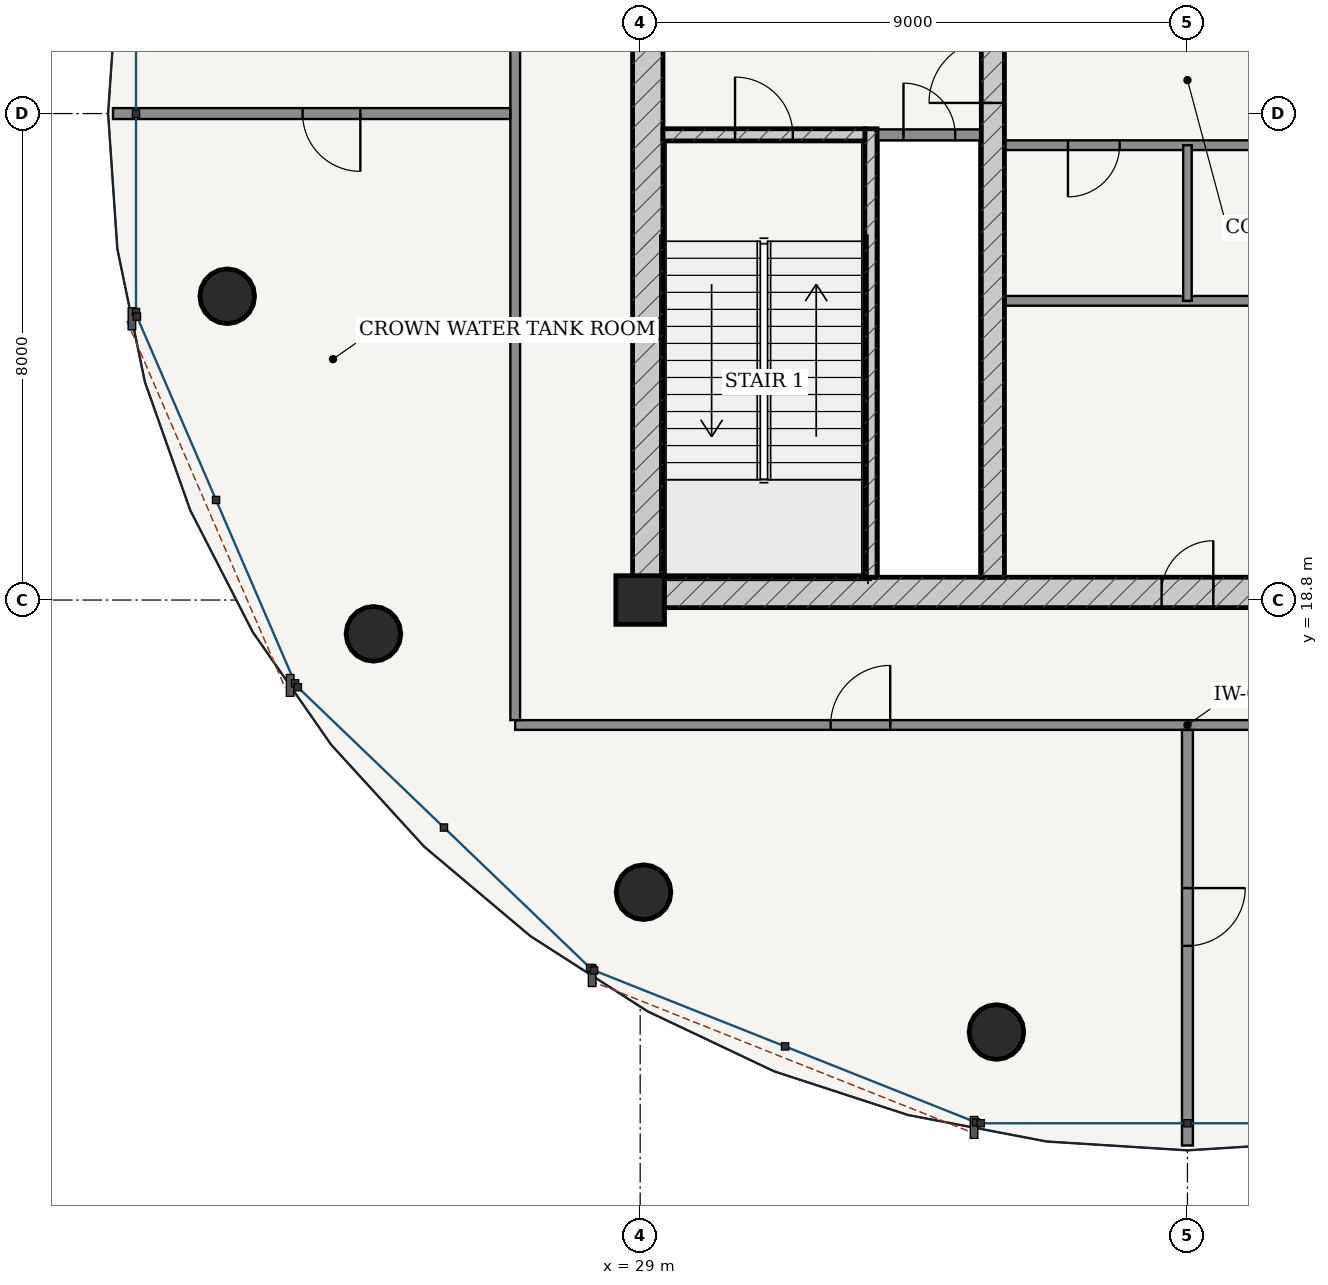
"""IFC4 building model, lengths in metres.
Left out: names, types, materials, properties, quantities, classifications, styles, units other than length and angle.
Written with IfcOpenShell. Run it as: python <this file> out.ifc"""

import sys

from ifc_helpers import new_model, si_unit, direction, frame, frame_2d, origin, origin_2d, place, context, subcontext, project, spatial, rectangle, hollow_circle, extrude, source, transform, mapped, element, fill, save


model = new_model("IFC4")
c1 = context("Model", 3, precision=1e-05, world=origin(), true_north=direction((-0.2419218956, 0.970295726276)))
c2 = subcontext(c1, "Body", "Model", "MODEL_VIEW")
j1 = project(units=[si_unit("LENGTHUNIT", "METRE"), si_unit("PLANEANGLEUNIT", "RADIAN")], contexts=[c1])
p1 = place(None, origin())
s1 = spatial("IfcSite", under=j1, at=p1, CompositionType="ELEMENT")
p2 = place(p1, origin())
s2 = spatial("IfcBuilding", under=s1, at=p2, CompositionType="ELEMENT")
p3 = place(p2, frame((0.0, 0.0, 311.3)))
s3 = spatial("IfcBuildingStorey", under=s2, at=p3, CompositionType="ELEMENT", Elevation=311.3)
p4 = place(p3, frame((29.0, 18.8, 0.0), z_axis=(0.0, 0.0, 1.0), x_axis=(1.0, 0.0, 0.0)))
e1 = element("IfcColumn", 1, at=p4, inside=s3, PredefinedType="COLUMN", context=c2, shape_type="SweptSolid", body=[
    extrude(rectangle(XDim=0.8, YDim=0.8, at=origin_2d()), origin(), (0.0, 0.0, 1.0), 5.2),
])
p5 = place(p3, frame((28.875, 18.925, 0.0), z_axis=(0.0, 0.0, 1.0), x_axis=(1.0, 0.0, 0.0)))
e2 = element("IfcWall", 2, at=p5, inside=s3, PredefinedType="SHEAR", context=c2, shape_type="SweptSolid", body=[
    extrude(rectangle(XDim=18.25, YDim=0.5, at=frame_2d((9.125, 0.0))), origin(), (0.0, 0.0, 1.0), 4.78),
])
p6 = place(p5, frame((8.7, 0.0, 0.0)))
e3 = element("IfcOpeningElement", 3, at=p6, cuts=e2, PredefinedType="OPENING", context=c2, shape_type="SweptSolid", body=[
    extrude(rectangle(XDim=0.85, YDim=2.1, at=frame_2d((0.425, 1.05))), frame((0.0, 0.26, 0.0), z_axis=(0.0, -1.0, 0.0), x_axis=(1.0, 0.0, 0.0)), (0.0, 0.0, 1.0), 0.52),
])
p7 = place(p3, frame((29.125, 19.175, 0.0), z_axis=(0.0, 0.0, 1.0), x_axis=(0.0, 1.0, 0.0)))
e4 = element("IfcWall", 4, at=p7, inside=s3, PredefinedType="SHEAR", context=c2, shape_type="SweptSolid", body=[
    extrude(rectangle(XDim=15.25, YDim=0.5, at=frame_2d((7.625, 0.0))), origin(), (0.0, 0.0, 1.0), 4.78),
])
p8 = place(p7, frame((9.875, 0.0, 0.0)))
e5 = element("IfcOpeningElement", 5, at=p8, cuts=e4, PredefinedType="OPENING", context=c2, shape_type="SweptSolid", body=[
    extrude(rectangle(XDim=1.5, YDim=2.2, at=frame_2d((0.75, 1.1))), frame((0.0, 0.26, 0.0), z_axis=(0.0, -1.0, 0.0), x_axis=(1.0, 0.0, 0.0)), (0.0, 0.0, 1.0), 0.52),
])
p9 = place(p3, frame((32.795, 19.175, 0.0), z_axis=(0.0, 0.0, 1.0), x_axis=(0.0, 1.0, 0.0)))
e6 = element("IfcWall", 6, at=p9, inside=s3, PredefinedType="SOLIDWALL", context=c2, shape_type="SweptSolid", body=[
    extrude(rectangle(XDim=7.375, YDim=0.2, at=frame_2d((3.688, 0.0))), origin(), (0.0, 0.0, 1.0), 4.78),
])
p10 = place(p3, frame((29.375, 26.45, 0.0), z_axis=(0.0, 0.0, 1.0), x_axis=(1.0, 0.0, 0.0)))
e7 = element("IfcWall", 7, at=p10, inside=s3, PredefinedType="SOLIDWALL", context=c2, shape_type="SweptSolid", body=[
    extrude(rectangle(XDim=3.32, YDim=0.2, at=frame_2d((1.66, 0.0))), origin(), (0.0, 0.0, 1.0), 4.78),
])
p11 = place(p10, frame((1.185, 0.0, 0.0)))
e8 = element("IfcOpeningElement", 8, at=p11, cuts=e7, PredefinedType="OPENING", context=c2, shape_type="SweptSolid", body=[
    extrude(rectangle(XDim=0.95, YDim=2.15, at=frame_2d((0.475, 1.075))), frame((0.0, 0.11, 0.0), z_axis=(0.0, -1.0, 0.0), x_axis=(1.0, 0.0, 0.0)), (0.0, 0.0, 1.0), 0.22),
])
p12 = place(p3, frame((34.8, 19.175, 0.0), z_axis=(0.0, 0.0, 1.0), x_axis=(0.0, 1.0, 0.0)))
e9 = element("IfcWall", 9, at=p12, inside=s3, PredefinedType="SHEAR", context=c2, shape_type="SweptSolid", body=[
    extrude(rectangle(XDim=15.25, YDim=0.38, at=frame_2d((7.625, 0.0))), origin(), (0.0, 0.0, 1.0), 4.78),
])
p13 = place(p12, frame((7.8, 0.0, 0.0)))
e10 = element("IfcOpeningElement", 10, at=p13, cuts=e9, PredefinedType="OPENING", context=c2, shape_type="SweptSolid", body=[
    extrude(rectangle(XDim=1.05, YDim=2.15, at=frame_2d((0.525, 1.075))), frame((0.0, 0.2, 0.0), z_axis=(0.0, -1.0, 0.0), x_axis=(1.0, 0.0, 0.0)), (0.0, 0.0, 1.0), 0.4),
])
for number, where, z_axis, x_axis in (
    (11, (22.209, 23.796, 0.0), (0.0, 0.0, 1.0), (1.0, 0.0, 0.0)),
    (12, (24.613, 18.244, 0.0), (0.0, 0.0, 1.0), (1.0, 0.0, 0.0)),
    (13, (29.055, 13.995, 0.0), (0.0, 0.0, 1.0), (1.0, 0.0, 0.0)),
    (14, (34.859, 11.696, 0.0), (0.0, 0.0, 1.0), (1.0, 0.0, 0.0)),
):
    element("IfcColumn", number, at=place(p3, frame(where, z_axis=z_axis, x_axis=x_axis)), inside=s3, PredefinedType="COLUMN", context=c2, shape_type="SweptSolid", body=[
        extrude(hollow_circle(Radius=0.45, WallThickness=0.032, at=origin_2d()), origin(), (0.0, 0.0, 1.0), 5.2),
    ])
p14 = place(p3, frame((32.9, 26.45, 0.0), z_axis=(0.0, 0.0, 1.0), x_axis=(1.0, 0.0, 0.0)))
e15 = element("IfcWall", 15, at=p14, inside=s3, PredefinedType="PARTITIONING", context=c2, shape_type="SweptSolid", body=[
    extrude(rectangle(XDim=1.71, YDim=0.18, at=frame_2d((0.855, 0.0))), origin(), (0.0, 0.0, 1.0), 4.78),
])
p15 = place(p14, frame((0.43, 0.0, 0.0)))
e16 = element("IfcOpeningElement", 16, at=p15, cuts=e15, PredefinedType="OPENING", context=c2, shape_type="SweptSolid", body=[
    extrude(rectangle(XDim=0.85, YDim=2.1, at=frame_2d((0.425, 1.05))), frame((0.0, 0.1, 0.0), z_axis=(0.0, -1.0, 0.0), x_axis=(1.0, 0.0, 0.0)), (0.0, 0.0, 1.0), 0.2),
])
p16 = place(p3, frame((34.99, 26.28, 0.0), z_axis=(0.0, 0.0, 1.0), x_axis=(1.0, 0.0, 0.0)))
e17 = element("IfcWall", 17, at=p16, inside=s3, PredefinedType="PARTITIONING", context=c2, shape_type="SweptSolid", body=[
    extrude(rectangle(XDim=6.02, YDim=0.16, at=frame_2d((3.01, 0.0))), origin(), (0.0, 0.0, 1.0), 4.78),
])
p17 = place(p16, frame((1.045, 0.0, 0.0)))
e18 = element("IfcOpeningElement", 18, at=p17, cuts=e17, PredefinedType="OPENING", context=c2, shape_type="SweptSolid", body=[
    extrude(rectangle(XDim=0.85, YDim=2.1, at=frame_2d((0.425, 1.05))), frame((0.0, 0.09, 0.0), z_axis=(0.0, -1.0, 0.0), x_axis=(1.0, 0.0, 0.0)), (0.0, 0.0, 1.0), 0.18),
])
p18 = place(p16, frame((4.125, 0.0, 0.0)))
e19 = element("IfcOpeningElement", 19, at=p18, cuts=e17, PredefinedType="OPENING", context=c2, shape_type="SweptSolid", body=[
    extrude(rectangle(XDim=0.85, YDim=2.1, at=frame_2d((0.425, 1.05))), frame((0.0, 0.09, 0.0), z_axis=(0.0, -1.0, 0.0), x_axis=(1.0, 0.0, 0.0)), (0.0, 0.0, 1.0), 0.18),
])
p19 = place(p3, frame((34.99, 23.72, 0.0), z_axis=(0.0, 0.0, 1.0), x_axis=(1.0, 0.0, 0.0)))
e20 = element("IfcWall", 20, at=p19, inside=s3, PredefinedType="PARTITIONING", context=c2, shape_type="SweptSolid", body=[
    extrude(rectangle(XDim=6.02, YDim=0.16, at=frame_2d((3.01, 0.0))), origin(), (0.0, 0.0, 1.0), 4.78),
])
p20 = place(p3, frame((38.0, 23.72, 0.0), z_axis=(0.0, 0.0, 1.0), x_axis=(0.0, 1.0, 0.0)))
e21 = element("IfcWall", 21, at=p20, inside=s3, PredefinedType="PARTITIONING", context=c2, shape_type="SweptSolid", body=[
    extrude(rectangle(XDim=2.56, YDim=0.14, at=frame_2d((1.28, 0.0))), origin(), (0.0, 0.0, 1.0), 4.78),
])
p21 = place(p3, frame((26.945, 16.745, 0.0), z_axis=(0.0, 0.0, 1.0), x_axis=(1.0, 0.0, 0.0)))
e22 = element("IfcWall", 22, at=p21, inside=s3, PredefinedType="PARTITIONING", context=c2, shape_type="SweptSolid", body=[
    extrude(rectangle(XDim=22.11, YDim=0.16, at=frame_2d((11.055, 0.0))), origin(), (0.0, 0.0, 1.0), 4.352),
])
p22 = place(p21, frame((5.187, 0.0, 0.0)))
e23 = element("IfcOpeningElement", 23, at=p22, cuts=e22, PredefinedType="OPENING", context=c2, shape_type="SweptSolid", body=[
    extrude(rectangle(XDim=0.98, YDim=2.2, at=frame_2d((0.49, 1.1))), frame((0.0, 0.09, 0.0), z_axis=(0.0, -1.0, 0.0), x_axis=(1.0, 0.0, 0.0)), (0.0, 0.0, 1.0), 0.18),
])
p23 = place(p21, frame((15.943, 0.0, 0.0)))
e24 = element("IfcOpeningElement", 24, at=p23, cuts=e22, PredefinedType="OPENING", context=c2, shape_type="SweptSolid", body=[
    extrude(rectangle(XDim=0.98, YDim=2.2, at=frame_2d((0.49, 1.1))), frame((0.0, 0.09, 0.0), z_axis=(0.0, -1.0, 0.0), x_axis=(1.0, 0.0, 0.0)), (0.0, 0.0, 1.0), 0.18),
])
p24 = place(p3, frame((26.945, 16.825, 0.0), z_axis=(0.0, 0.0, 1.0), x_axis=(0.0, 1.0, 0.0)))
e25 = element("IfcWall", 25, at=p24, inside=s3, PredefinedType="PARTITIONING", context=c2, shape_type="SweptSolid", body=[
    extrude(rectangle(XDim=19.95, YDim=0.16, at=frame_2d((9.975, 0.0))), origin(), (0.0, 0.0, 1.0), 4.352),
])
p25 = place(p3, frame((26.863, 26.8, 0.0), z_axis=(0.0, 0.0, 1.0), x_axis=(-1.0, 0.0, 0.0)))
e26 = element("IfcWall", 26, at=p25, inside=s3, PredefinedType="PARTITIONING", context=c2, shape_type="SweptSolid", body=[
    extrude(rectangle(XDim=6.533, YDim=0.18, at=frame_2d((3.267, 0.0))), origin(), (0.0, 0.0, 1.0), 4.411),
])
p26 = place(p25, frame((2.465, 0.0, 0.0)))
e27 = element("IfcOpeningElement", 27, at=p26, cuts=e26, PredefinedType="OPENING", context=c2, shape_type="SweptSolid", body=[
    extrude(rectangle(XDim=0.95, YDim=2.15, at=frame_2d((0.475, 1.075))), frame((0.0, 0.1, 0.0), z_axis=(0.0, -1.0, 0.0), x_axis=(1.0, 0.0, 0.0)), (0.0, 0.0, 1.0), 0.2),
])
p27 = place(p3, frame((38.0, 16.663, 0.0), z_axis=(0.0, 0.0, 1.0), x_axis=(0.0, -1.0, 0.0)))
e28 = element("IfcWall", 28, at=p27, inside=s3, PredefinedType="PARTITIONING", context=c2, shape_type="SweptSolid", body=[
    extrude(rectangle(XDim=6.833, YDim=0.18, at=frame_2d((3.417, 0.0))), origin(), (0.0, 0.0, 1.0), 4.411),
])
p28 = place(p27, frame((2.6, 0.0, 0.0)))
e29 = element("IfcOpeningElement", 29, at=p28, cuts=e28, PredefinedType="OPENING", context=c2, shape_type="SweptSolid", body=[
    extrude(rectangle(XDim=0.95, YDim=2.15, at=frame_2d((0.475, 1.075))), frame((0.0, 0.1, 0.0), z_axis=(0.0, -1.0, 0.0), x_axis=(1.0, 0.0, 0.0)), (0.0, 0.0, 1.0), 0.2),
])
m1 = source(origin(), c2, "Body", "SweptSolid", [
    extrude(rectangle(XDim=1.05, YDim=2.15, at=frame_2d((0.525, 1.075))), frame((0.0, 0.025, 0.0), z_axis=(0.0, -1.0, 0.0), x_axis=(1.0, 0.0, 0.0)), (0.0, 0.0, 1.0), 0.05),
])
p29 = place(p13, origin())
e30 = element("IfcDoor", 30, at=p29, inside=s3, OperationType="SINGLE_SWING_LEFT", PredefinedType="DOOR", context=c2, shape_type="MappedRepresentation", body=[
    mapped(m1, transform((0.0, 0.0, 0.0), scale=1.0)),
])
fill(e10, e30)
m2 = source(origin(), c2, "Body", "SweptSolid", [
    extrude(rectangle(XDim=0.95, YDim=2.15, at=frame_2d((0.475, 1.075))), frame((0.0, 0.025, 0.0), z_axis=(0.0, -1.0, 0.0), x_axis=(1.0, 0.0, 0.0)), (0.0, 0.0, 1.0), 0.05),
])
p30 = place(p11, origin())
e31 = element("IfcDoor", 31, at=p30, inside=s3, OperationType="SINGLE_SWING_LEFT", PredefinedType="DOOR", context=c2, shape_type="MappedRepresentation", body=[
    mapped(m2, transform((0.0, 0.0, 0.0), scale=1.0)),
])
fill(e8, e31)
m3 = source(origin(), c2, "Body", "SweptSolid", [
    extrude(rectangle(XDim=0.85, YDim=2.1, at=frame_2d((0.425, 1.05))), frame((0.0, 0.025, 0.0), z_axis=(0.0, -1.0, 0.0), x_axis=(1.0, 0.0, 0.0)), (0.0, 0.0, 1.0), 0.05),
])
p31 = place(p15, origin())
e32 = element("IfcDoor", 32, at=p31, inside=s3, OperationType="SINGLE_SWING_LEFT", PredefinedType="DOOR", context=c2, shape_type="MappedRepresentation", body=[
    mapped(m3, transform((0.0, 0.0, 0.0), scale=1.0)),
])
fill(e16, e32)
p32 = place(p17, frame((0.85, 0.0, 0.0), z_axis=(0.0, 0.0, 1.0), x_axis=(-1.0, 0.0, 0.0)))
e33 = element("IfcDoor", 33, at=p32, inside=s3, OperationType="SINGLE_SWING_RIGHT", PredefinedType="DOOR", context=c2, shape_type="MappedRepresentation", body=[
    mapped(m3, transform((0.0, 0.0, 0.0), scale=1.0)),
])
fill(e18, e33)
p33 = place(p6, origin())
e34 = element("IfcDoor", 34, at=p33, inside=s3, OperationType="SINGLE_SWING_RIGHT", PredefinedType="DOOR", context=c2, shape_type="MappedRepresentation", body=[
    mapped(m3, transform((0.0, 0.0, 0.0), scale=1.0)),
])
fill(e3, e34)
m4 = source(origin(), c2, "Body", "SweptSolid", [
    extrude(rectangle(XDim=0.98, YDim=2.2, at=frame_2d((0.49, 1.1))), frame((0.0, 0.025, 0.0), z_axis=(0.0, -1.0, 0.0), x_axis=(1.0, 0.0, 0.0)), (0.0, 0.0, 1.0), 0.05),
])
p34 = place(p22, origin())
e35 = element("IfcDoor", 35, at=p34, inside=s3, OperationType="SINGLE_SWING_RIGHT", PredefinedType="DOOR", context=c2, shape_type="MappedRepresentation", body=[
    mapped(m4, transform((0.0, 0.0, 0.0), scale=1.0)),
])
fill(e23, e35)
p35 = place(p26, origin())
e36 = element("IfcDoor", 36, at=p35, inside=s3, OperationType="SINGLE_SWING_LEFT", PredefinedType="DOOR", context=c2, shape_type="MappedRepresentation", body=[
    mapped(m2, transform((0.0, 0.0, 0.0), scale=1.0)),
])
fill(e27, e36)
p36 = place(p28, origin())
e37 = element("IfcDoor", 37, at=p36, inside=s3, OperationType="SINGLE_SWING_LEFT", PredefinedType="DOOR", context=c2, shape_type="MappedRepresentation", body=[
    mapped(m2, transform((0.0, 0.0, 0.0), scale=1.0)),
])
fill(e29, e37)
save(model, sys.argv[1])
